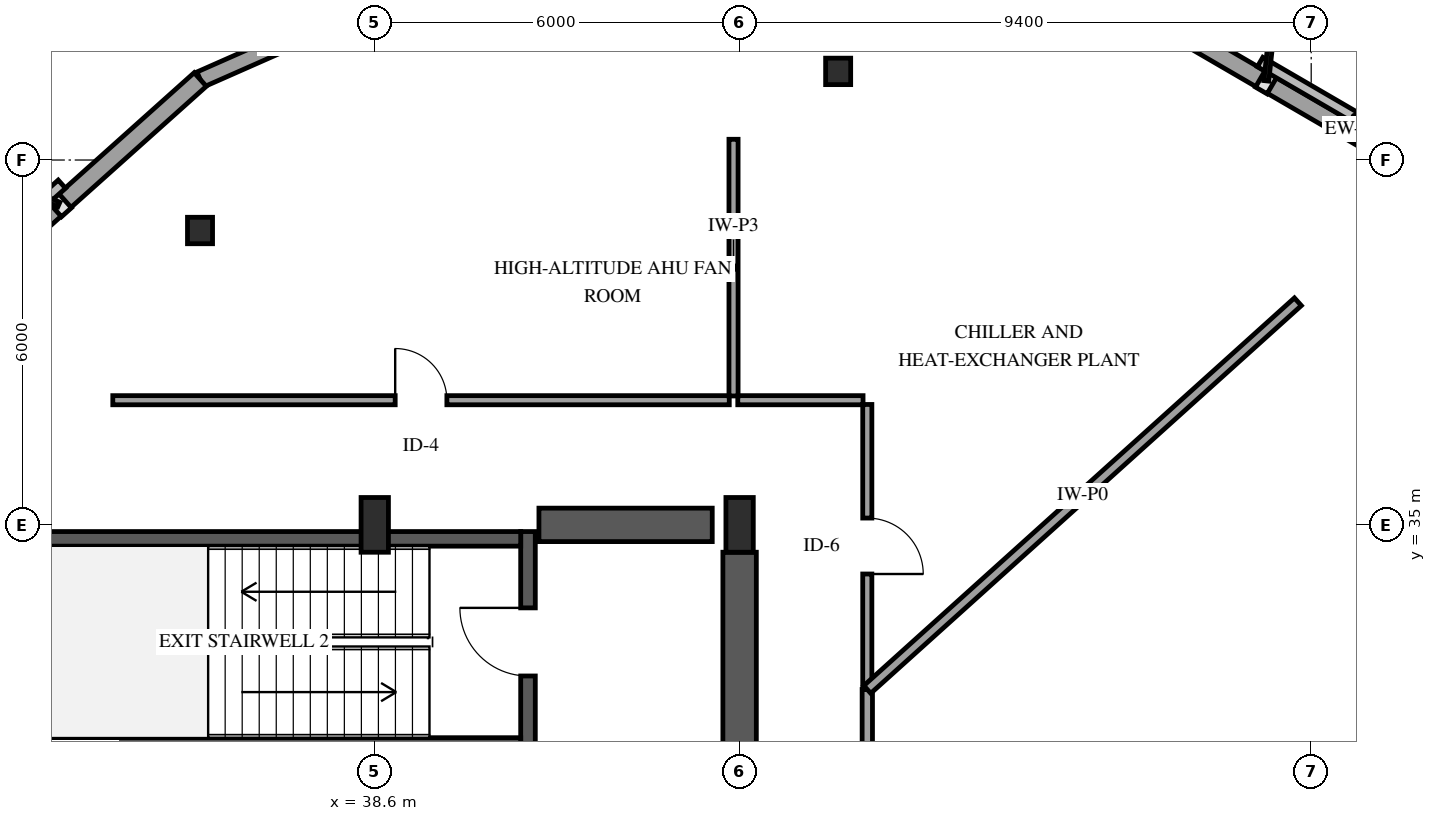
"""IFC4 building model, lengths in metres.
Left out: names, types, materials, properties, quantities, classifications, styles, units other than length and angle.
Written with IfcOpenShell. Run it as: python <this file> out.ifc"""

import sys

from ifc_helpers import new_model, si_unit, direction, frame, frame_2d, origin, origin_2d, place, context, subcontext, project, spatial, rectangle, i_section, extrude, element, fill, save


model = new_model("IFC4")
c1 = context("Model", 3, precision=1e-05, world=origin(), true_north=direction((0.0, 1.0)))
c2 = subcontext(c1, "Body", "Model", "MODEL_VIEW")
j1 = project(units=[si_unit("LENGTHUNIT", "METRE"), si_unit("PLANEANGLEUNIT", "RADIAN")], contexts=[c1])
p1 = place(None, origin())
s1 = spatial("IfcSite", under=j1, at=p1, CompositionType="ELEMENT")
p2 = place(p1, origin())
s2 = spatial("IfcBuilding", under=s1, at=p2, CompositionType="ELEMENT")
p3 = place(p2, frame((0.0, 0.0, 185.8)))
s3 = spatial("IfcBuildingStorey", under=s2, at=p3, CompositionType="ELEMENT", Elevation=185.8)
p4 = place(p3, frame((41.12, 31.26, 0.0), z_axis=(0.0, 0.0, 1.0), x_axis=(0.0, 1.0, 0.0)))
e1 = element("IfcWall", 1, at=p4, inside=s3, PredefinedType="SHEAR", context=c2, shape_type="SweptSolid", body=[
    extrude(rectangle(XDim=3.63, YDim=0.24, at=frame_2d((1.815, 0.0))), origin(), (0.0, 0.0, 1.0), 4.8),
])
p5 = place(p4, frame((1.255, 0.0, 0.0)))
e2 = element("IfcOpeningElement", 2, at=p5, cuts=e1, PredefinedType="OPENING", context=c2, shape_type="SweptSolid", body=[
    extrude(rectangle(XDim=1.12, YDim=2.15, at=frame_2d((0.56, 1.075))), frame((0.0, 0.13, 0.0), z_axis=(0.0, -1.0, 0.0), x_axis=(1.0, 0.0, 0.0)), (0.0, 0.0, 1.0), 0.26),
])
for number, where, z_axis, x_axis in (
    (3, (33.0, 31.38, 0.0), (0.0, 0.0, 1.0), (1.0, 0.0, 0.0)),
    (4, (33.0, 34.77, 0.0), (0.0, 0.0, 1.0), (1.0, 0.0, 0.0)),
):
    element("IfcWall", number, at=place(p3, frame(where, z_axis=z_axis, x_axis=x_axis)), inside=s3, PredefinedType="SHEAR", context=c2, shape_type="SweptSolid", body=[
        extrude(rectangle(XDim=8.0, YDim=0.24, at=frame_2d((4.0, 0.0))), origin(), (0.0, 0.0, 1.0), 4.8),
    ])
p6 = place(p3, frame((41.3, 35.0, 0.0), z_axis=(0.0, 0.0, 1.0), x_axis=(1.0, 0.0, 0.0)))
e5 = element("IfcWall", 5, at=p6, inside=s3, PredefinedType="SHEAR", context=c2, shape_type="SweptSolid", body=[
    extrude(rectangle(XDim=2.85, YDim=0.55, at=frame_2d((1.425, 0.0))), origin(), (0.0, 0.0, 1.0), 4.8),
])
p7 = place(p3, frame((44.6, 29.8, 0.0), z_axis=(0.0, 0.0, 1.0), x_axis=(0.0, 1.0, 0.0)))
e6 = element("IfcWall", 6, at=p7, inside=s3, PredefinedType="SHEAR", context=c2, shape_type="SweptSolid", body=[
    extrude(rectangle(XDim=4.75, YDim=0.55, at=frame_2d((2.375, 0.0))), origin(), (0.0, 0.0, 1.0), 4.8),
])
for number, where, z_axis, x_axis in (
    (7, (38.6, 35.0, 0.0), (0.0, 0.0, 1.0), (1.0, 0.0, 0.0)),
    (8, (44.6, 35.0, 0.0), (0.0, 0.0, 1.0), (1.0, 0.0, 0.0)),
):
    element("IfcColumn", number, at=place(p3, frame(where, z_axis=z_axis, x_axis=x_axis)), inside=s3, PredefinedType="PILASTER", context=c2, shape_type="SweptSolid", body=[
        extrude(rectangle(XDim=0.45, YDim=0.9, at=origin_2d()), origin(), (0.0, 0.0, 1.0), 4.5),
    ])
for number, where, z_axis, x_axis in (
    (9, (46.221, 42.458, 0.0), (0.0, 0.0, 1.0), (1.0, 0.0, 0.0)),
    (10, (35.726, 39.841, 0.0), (0.0, 0.0, 1.0), (1.0, 0.0, 0.0)),
):
    element("IfcColumn", number, at=place(p3, frame(where, z_axis=z_axis, x_axis=x_axis)), inside=s3, PredefinedType="COLUMN", context=c2, shape_type="SweptSolid", body=[
        extrude(i_section(OverallWidth=0.412, OverallDepth=0.435, WebThickness=0.036, FlangeThickness=0.057, FilletRadius=0.038, at=origin_2d()), origin(), (0.0, 0.0, 1.0), 4.5),
    ])
p8 = place(p3, frame((58.612, 39.169, 0.0), z_axis=(0.0, 0.0, 1.0), x_axis=(-0.864445551727, 0.502726454544, 0.0)))
e11 = element("IfcWall", 11, at=p8, inside=s3, PredefinedType="SOLIDWALL", context=c2, shape_type="SweptSolid", body=[
    extrude(rectangle(XDim=9.287, YDim=0.3, at=frame_2d((4.644, 0.0))), origin(), (0.0, 0.0, 1.0), 3.879),
])
p9 = place(p3, frame((38.444, 43.522, 0.0), z_axis=(0.0, 0.0, 1.0), x_axis=(-0.914830177707, -0.403838762325, 0.0)))
e12 = element("IfcWall", 12, at=p9, inside=s3, PredefinedType="SOLIDWALL", context=c2, shape_type="SweptSolid", body=[
    extrude(rectangle(XDim=2.967, YDim=0.27, at=frame_2d((1.483, 0.0))), origin(), (0.0, 0.0, 1.0), 3.879),
])
p10 = place(p3, frame((35.73, 42.324, 0.0), z_axis=(0.0, 0.0, 1.0), x_axis=(-0.745239938456, -0.666796396308, 0.0)))
e13 = element("IfcWall", 13, at=p10, inside=s3, PredefinedType="SOLIDWALL", context=c2, shape_type="SweptSolid", body=[
    extrude(rectangle(XDim=9.287, YDim=0.3, at=frame_2d((4.644, 0.0))), origin(), (0.0, 0.0, 1.0), 3.879),
])
p11 = place(p3, frame((46.7, 32.293, 0.0), z_axis=(0.0, 0.0, 1.0), x_axis=(0.0, -1.0, 0.0)))
e14 = element("IfcWall", 14, at=p11, inside=s3, PredefinedType="PARTITIONING", context=c2, shape_type="SweptSolid", body=[
    extrude(rectangle(XDim=8.639, YDim=0.17, at=frame_2d((4.319, 0.0))), origin(), (0.0, 0.0, 1.0), 4.5),
])
p12 = place(p11, frame((3.844, 0.0, 0.0)))
e15 = element("IfcOpeningElement", 15, at=p12, cuts=e14, PredefinedType="OPENING", context=c2, shape_type="SweptSolid", body=[
    extrude(rectangle(XDim=0.92, YDim=2.12, at=frame_2d((0.46, 1.06))), frame((0.0, 0.095, 0.0), z_axis=(0.0, -1.0, 0.0), x_axis=(1.0, 0.0, 0.0)), (0.0, 0.0, 1.0), 0.19),
])
p13 = place(p3, frame((46.7, 36.98, 0.0), z_axis=(0.0, 0.0, 1.0), x_axis=(0.0, -1.0, 0.0)))
e16 = element("IfcWall", 16, at=p13, inside=s3, PredefinedType="PARTITIONING", context=c2, shape_type="SweptSolid", body=[
    extrude(rectangle(XDim=4.687, YDim=0.15, at=frame_2d((2.344, 0.0))), origin(), (0.0, 0.0, 1.0), 4.5),
])
p14 = place(p13, frame((1.868, 0.0, 0.0)))
e17 = element("IfcOpeningElement", 17, at=p14, cuts=e16, PredefinedType="OPENING", context=c2, shape_type="SweptSolid", body=[
    extrude(rectangle(XDim=0.92, YDim=2.12, at=frame_2d((0.46, 1.06))), frame((0.0, 0.085, 0.0), z_axis=(0.0, -1.0, 0.0), x_axis=(1.0, 0.0, 0.0)), (0.0, 0.0, 1.0), 0.17),
])
p15 = place(p3, frame((44.57, 37.05, 0.0), z_axis=(0.0, 0.0, 1.0), x_axis=(1.0, 0.0, 0.0)))
e18 = element("IfcWall", 18, at=p15, inside=s3, PredefinedType="PARTITIONING", context=c2, shape_type="SweptSolid", body=[
    extrude(rectangle(XDim=2.06, YDim=0.15, at=frame_2d((1.03, 0.0))), origin(), (0.0, 0.0, 1.0), 4.5),
])
p16 = place(p3, frame((34.292, 37.05, 0.0), z_axis=(0.0, 0.0, 1.0), x_axis=(1.0, 0.0, 0.0)))
e19 = element("IfcWall", 19, at=p16, inside=s3, PredefinedType="PARTITIONING", context=c2, shape_type="SweptSolid", body=[
    extrude(rectangle(XDim=10.138, YDim=0.15, at=frame_2d((5.069, 0.0))), origin(), (0.0, 0.0, 1.0), 4.5),
])
p17 = place(p16, frame((4.644, 0.0, 0.0)))
e20 = element("IfcOpeningElement", 20, at=p17, cuts=e19, PredefinedType="OPENING", context=c2, shape_type="SweptSolid", body=[
    extrude(rectangle(XDim=0.85, YDim=2.1, at=frame_2d((0.425, 1.05))), frame((0.0, 0.085, 0.0), z_axis=(0.0, -1.0, 0.0), x_axis=(1.0, 0.0, 0.0)), (0.0, 0.0, 1.0), 0.17),
])
p18 = place(p3, frame((53.781, 38.669, 0.0), z_axis=(0.0, 0.0, 1.0), x_axis=(-0.743136147703, -0.669140243878, 0.0)))
e21 = element("IfcWall", 21, at=p18, inside=s3, PredefinedType="PARTITIONING", context=c2, shape_type="SweptSolid", body=[
    extrude(rectangle(XDim=9.529, YDim=0.17, at=frame_2d((4.764, 0.0))), origin(), (0.0, 0.0, 1.0), 2.57),
])
p19 = place(p3, frame((44.5, 41.341, 0.0), z_axis=(0.0, 0.0, 1.0), x_axis=(0.0, -1.0, 0.0)))
e22 = element("IfcWall", 22, at=p19, inside=s3, PredefinedType="PARTITIONING", context=c2, shape_type="SweptSolid", body=[
    extrude(rectangle(XDim=4.221, YDim=0.15, at=frame_2d((2.11, 0.0))), origin(), (0.0, 0.0, 1.0), 3.874),
])
p20 = place(p5, origin())
e23 = element("IfcDoor", 23, at=p20, inside=s3, OperationType="SINGLE_SWING_RIGHT", PredefinedType="DOOR", context=c2, shape_type="SweptSolid", body=[
    extrude(rectangle(XDim=1.12, YDim=2.15, at=frame_2d((0.56, 1.075))), frame((0.0, 0.025, 0.0), z_axis=(0.0, -1.0, 0.0), x_axis=(1.0, 0.0, 0.0)), (0.0, 0.0, 1.0), 0.05),
])
fill(e2, e23)
p21 = place(p14, origin())
e24 = element("IfcDoor", 24, at=p21, inside=s3, OperationType="SINGLE_SWING_RIGHT", PredefinedType="DOOR", context=c2, shape_type="SweptSolid", body=[
    extrude(rectangle(XDim=0.92, YDim=2.12, at=frame_2d((0.46, 1.06))), frame((0.0, 0.025, 0.0), z_axis=(0.0, -1.0, 0.0), x_axis=(1.0, 0.0, 0.0)), (0.0, 0.0, 1.0), 0.05),
])
fill(e17, e24)
p22 = place(p17, origin())
e25 = element("IfcDoor", 25, at=p22, inside=s3, OperationType="SINGLE_SWING_LEFT", PredefinedType="DOOR", context=c2, shape_type="SweptSolid", body=[
    extrude(rectangle(XDim=0.85, YDim=2.1, at=frame_2d((0.425, 1.05))), frame((0.0, 0.025, 0.0), z_axis=(0.0, -1.0, 0.0), x_axis=(1.0, 0.0, 0.0)), (0.0, 0.0, 1.0), 0.05),
])
fill(e20, e25)
save(model, sys.argv[1])
